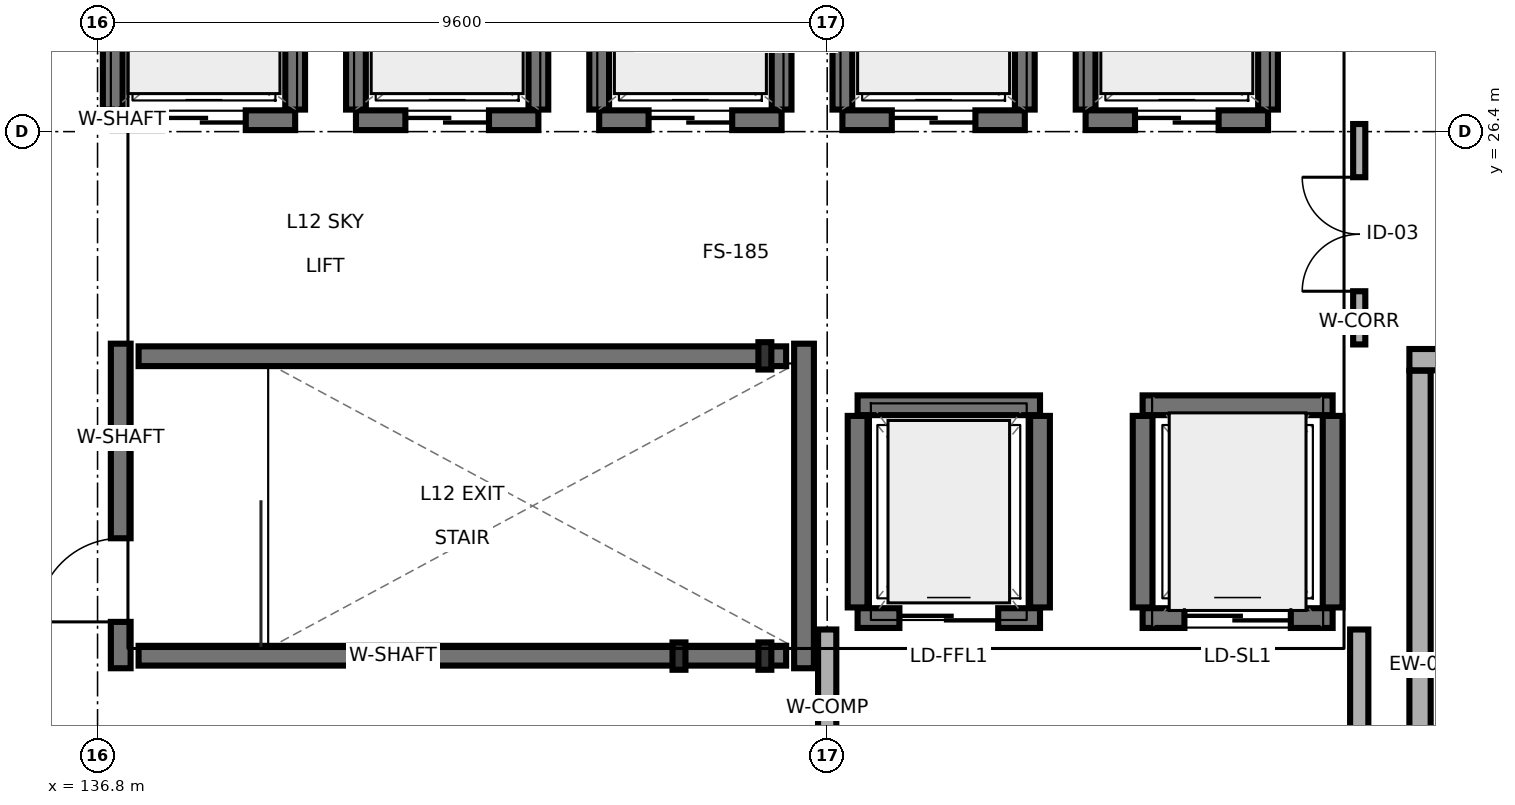
"""IFC4 building model, lengths in metres.
Left out: names, types, materials, properties, quantities, classifications, styles, units other than length and angle.
Written with IfcOpenShell. Run it as: python <this file> out.ifc"""

import sys

from ifc_helpers import new_model, si_unit, direction, frame, frame_2d, origin, origin_2d, place, context, subcontext, project, spatial, rectangle, i_section, extrude, element, fill, save


model = new_model("IFC4")
c1 = context("Model", 3, precision=1e-05, world=origin(), true_north=direction((0.0, 1.0)))
c2 = subcontext(c1, "Body", "Model", "MODEL_VIEW")
j1 = project(units=[si_unit("LENGTHUNIT", "METRE"), si_unit("PLANEANGLEUNIT", "RADIAN")], contexts=[c1])
p1 = place(None, origin())
s1 = spatial("IfcSite", under=j1, at=p1, CompositionType="ELEMENT")
p2 = place(p1, origin())
s2 = spatial("IfcBuilding", under=s1, at=p2, CompositionType="ELEMENT")
p3 = place(p2, frame((0.0, 0.0, 41.9)))
s3 = spatial("IfcBuildingStorey", under=s2, at=p3, CompositionType="ELEMENT", Elevation=41.9)
for number, where, z_axis, x_axis in (
    (1, (144.45, 19.5, 0.0), (0.0, 0.0, 1.0), (1.0, 0.0, 0.0)),
    (2, (145.58, 19.5, 0.0), (0.0, 0.0, 1.0), (1.0, 0.0, 0.0)),
    (3, (145.58, 23.45, 0.0), (0.0, 0.0, 1.0), (1.0, 0.0, 0.0)),
):
    element("IfcColumn", number, at=place(p3, frame(where, z_axis=z_axis, x_axis=x_axis)), inside=s3, PredefinedType="PILASTER", context=c2, shape_type="SweptSolid", body=[
        extrude(i_section(OverallWidth=0.17, OverallDepth=0.36, WebThickness=0.008, FlangeThickness=0.013, FilletRadius=0.018, at=origin_2d()), origin(), (0.0, 0.0, 1.0), 4.2),
    ])
p4 = place(p3, frame((154.2, 15.503, 0.0), z_axis=(0.0, 0.0, 1.0), x_axis=(0.0, 1.0, 0.0)))
e4 = element("IfcWall", 4, at=p4, inside=s3, PredefinedType="SOLIDWALL", context=c2, shape_type="SweptSolid", body=[
    extrude(rectangle(XDim=7.752, YDim=0.28, at=frame_2d((3.876, 0.0))), origin(), (0.0, 0.0, 1.0), 3.53),
])
p5 = place(p3, frame((154.06, 23.4, 0.0), z_axis=(0.0, 0.0, 1.0), x_axis=(1.0, 0.0, 0.0)))
e5 = element("IfcWall", 5, at=p5, inside=s3, PredefinedType="SOLIDWALL", context=c2, shape_type="SweptSolid", body=[
    extrude(rectangle(XDim=9.74, YDim=0.28, at=frame_2d((4.87, 0.0))), origin(), (0.0, 0.0, 1.0), 3.54),
])
p6 = place(p5, frame((4.07, 0.0, 0.0)))
e6 = element("IfcOpeningElement", 6, at=p6, cuts=e5, PredefinedType="OPENING", context=c2, shape_type="SweptSolid", body=[
    extrude(rectangle(XDim=1.6, YDim=2.2, at=frame_2d((0.8, 1.1))), frame((0.0, 0.15, 0.0), z_axis=(0.0, -1.0, 0.0), x_axis=(1.0, 0.0, 0.0)), (0.0, 0.0, 1.0), 0.3),
])
p7 = place(p3, frame((137.105, 19.34, 0.0), z_axis=(0.0, 0.0, 1.0), x_axis=(0.0, 1.0, 0.0)))
e7 = element("IfcWall", 7, at=p7, inside=s3, PredefinedType="SHEAR", context=c2, shape_type="SweptSolid", body=[
    extrude(rectangle(XDim=4.27, YDim=0.26, at=frame_2d((2.135, 0.0))), origin(), (0.0, 0.0, 1.0), 3.995),
])
p8 = place(p7, frame((0.61, 0.0, 0.0)))
e8 = element("IfcOpeningElement", 8, at=p8, cuts=e7, PredefinedType="OPENING", context=c2, shape_type="SweptSolid", body=[
    extrude(rectangle(XDim=1.1, YDim=2.2, at=frame_2d((0.55, 1.1))), frame((0.0, 0.14, 0.0), z_axis=(0.0, -1.0, 0.0), x_axis=(1.0, 0.0, 0.0)), (0.0, 0.0, 1.0), 0.28),
])
p9 = place(p3, frame((146.095, 19.34, 0.0), z_axis=(0.0, 0.0, 1.0), x_axis=(0.0, 1.0, 0.0)))
e9 = element("IfcWall", 9, at=p9, inside=s3, PredefinedType="SHEAR", context=c2, shape_type="SweptSolid", body=[
    extrude(rectangle(XDim=4.27, YDim=0.26, at=frame_2d((2.135, 0.0))), origin(), (0.0, 0.0, 1.0), 3.995),
])
for number, where, z_axis, x_axis in (
    (10, (137.34, 19.505, 0.0), (0.0, 0.0, 1.0), (1.0, 0.0, 0.0)),
    (11, (137.34, 23.445, 0.0), (0.0, 0.0, 1.0), (1.0, 0.0, 0.0)),
):
    element("IfcWall", number, at=place(p3, frame(where, z_axis=z_axis, x_axis=x_axis)), inside=s3, PredefinedType="SHEAR", context=c2, shape_type="SweptSolid", body=[
        extrude(rectangle(XDim=8.52, YDim=0.26, at=frame_2d((4.26, 0.0))), origin(), (0.0, 0.0, 1.0), 3.995),
    ])
p10 = place(p3, frame((137.0, 26.55, 0.0), z_axis=(0.0, 0.0, 1.0), x_axis=(1.0, 0.0, 0.0)))
e12 = element("IfcWall", 12, at=p10, inside=s3, PredefinedType="SHEAR", context=c2, shape_type="SweptSolid", body=[
    extrude(rectangle(XDim=2.4, YDim=0.26, at=frame_2d((1.2, 0.0))), origin(), (0.0, 0.0, 1.0), 3.53),
])
p11 = place(p10, frame((0.65, 0.0, 0.0)))
e13 = element("IfcOpeningElement", 13, at=p11, cuts=e12, PredefinedType="OPENING", context=c2, shape_type="SweptSolid", body=[
    extrude(rectangle(XDim=1.1, YDim=2.2, at=frame_2d((0.55, 1.1))), frame((0.0, 0.14, 0.0), z_axis=(0.0, -1.0, 0.0), x_axis=(1.0, 0.0, 0.0)), (0.0, 0.0, 1.0), 0.28),
])
for number, where, z_axis, x_axis in (
    (14, (137.0, 26.69, 0.0), (0.0, 0.0, 1.0), (0.0, 1.0, 0.0)),
    (15, (139.4, 26.69, 0.0), (0.0, 0.0, 1.0), (0.0, 1.0, 0.0)),
):
    element("IfcWall", number, at=place(p3, frame(where, z_axis=z_axis, x_axis=x_axis)), inside=s3, PredefinedType="SHEAR", context=c2, shape_type="SweptSolid", body=[
        extrude(rectangle(XDim=1.82, YDim=0.26, at=frame_2d((0.91, 0.0))), origin(), (0.0, 0.0, 1.0), 3.53),
    ])
p12 = place(p3, frame((140.2, 26.55, 0.0), z_axis=(0.0, 0.0, 1.0), x_axis=(1.0, 0.0, 0.0)))
e16 = element("IfcWall", 16, at=p12, inside=s3, PredefinedType="SHEAR", context=c2, shape_type="SweptSolid", body=[
    extrude(rectangle(XDim=2.4, YDim=0.26, at=frame_2d((1.2, 0.0))), origin(), (0.0, 0.0, 1.0), 3.995),
])
p13 = place(p12, frame((0.65, 0.0, 0.0)))
e17 = element("IfcOpeningElement", 17, at=p13, cuts=e16, PredefinedType="OPENING", context=c2, shape_type="SweptSolid", body=[
    extrude(rectangle(XDim=1.1, YDim=2.2, at=frame_2d((0.55, 1.1))), frame((0.0, 0.14, 0.0), z_axis=(0.0, -1.0, 0.0), x_axis=(1.0, 0.0, 0.0)), (0.0, 0.0, 1.0), 0.28),
])
for number, where, z_axis, x_axis in (
    (18, (140.2, 26.69, 0.0), (0.0, 0.0, 1.0), (0.0, 1.0, 0.0)),
    (19, (142.6, 26.69, 0.0), (0.0, 0.0, 1.0), (0.0, 1.0, 0.0)),
):
    element("IfcWall", number, at=place(p3, frame(where, z_axis=z_axis, x_axis=x_axis)), inside=s3, PredefinedType="SHEAR", context=c2, shape_type="SweptSolid", body=[
        extrude(rectangle(XDim=1.82, YDim=0.26, at=frame_2d((0.91, 0.0))), origin(), (0.0, 0.0, 1.0), 3.995),
    ])
p14 = place(p3, frame((143.4, 26.55, 0.0), z_axis=(0.0, 0.0, 1.0), x_axis=(1.0, 0.0, 0.0)))
e20 = element("IfcWall", 20, at=p14, inside=s3, PredefinedType="SHEAR", context=c2, shape_type="SweptSolid", body=[
    extrude(rectangle(XDim=2.4, YDim=0.26, at=frame_2d((1.2, 0.0))), origin(), (0.0, 0.0, 1.0), 3.995),
])
p15 = place(p14, frame((0.65, 0.0, 0.0)))
e21 = element("IfcOpeningElement", 21, at=p15, cuts=e20, PredefinedType="OPENING", context=c2, shape_type="SweptSolid", body=[
    extrude(rectangle(XDim=1.1, YDim=2.2, at=frame_2d((0.55, 1.1))), frame((0.0, 0.14, 0.0), z_axis=(0.0, -1.0, 0.0), x_axis=(1.0, 0.0, 0.0)), (0.0, 0.0, 1.0), 0.28),
])
for number, where, z_axis, x_axis in (
    (22, (143.4, 26.69, 0.0), (0.0, 0.0, 1.0), (0.0, 1.0, 0.0)),
    (23, (145.8, 26.69, 0.0), (0.0, 0.0, 1.0), (0.0, 1.0, 0.0)),
):
    element("IfcWall", number, at=place(p3, frame(where, z_axis=z_axis, x_axis=x_axis)), inside=s3, PredefinedType="SHEAR", context=c2, shape_type="SweptSolid", body=[
        extrude(rectangle(XDim=1.82, YDim=0.26, at=frame_2d((0.91, 0.0))), origin(), (0.0, 0.0, 1.0), 3.995),
    ])
p16 = place(p3, frame((146.6, 26.55, 0.0), z_axis=(0.0, 0.0, 1.0), x_axis=(1.0, 0.0, 0.0)))
e24 = element("IfcWall", 24, at=p16, inside=s3, PredefinedType="SHEAR", context=c2, shape_type="SweptSolid", body=[
    extrude(rectangle(XDim=2.4, YDim=0.26, at=frame_2d((1.2, 0.0))), origin(), (0.0, 0.0, 1.0), 3.995),
])
p17 = place(p16, frame((0.65, 0.0, 0.0)))
e25 = element("IfcOpeningElement", 25, at=p17, cuts=e24, PredefinedType="OPENING", context=c2, shape_type="SweptSolid", body=[
    extrude(rectangle(XDim=1.1, YDim=2.2, at=frame_2d((0.55, 1.1))), frame((0.0, 0.14, 0.0), z_axis=(0.0, -1.0, 0.0), x_axis=(1.0, 0.0, 0.0)), (0.0, 0.0, 1.0), 0.28),
])
for number, where, z_axis, x_axis in (
    (26, (146.6, 26.69, 0.0), (0.0, 0.0, 1.0), (0.0, 1.0, 0.0)),
    (27, (149.0, 26.69, 0.0), (0.0, 0.0, 1.0), (0.0, 1.0, 0.0)),
):
    element("IfcWall", number, at=place(p3, frame(where, z_axis=z_axis, x_axis=x_axis)), inside=s3, PredefinedType="SHEAR", context=c2, shape_type="SweptSolid", body=[
        extrude(rectangle(XDim=1.82, YDim=0.26, at=frame_2d((0.91, 0.0))), origin(), (0.0, 0.0, 1.0), 3.995),
    ])
p18 = place(p3, frame((149.8, 26.55, 0.0), z_axis=(0.0, 0.0, 1.0), x_axis=(1.0, 0.0, 0.0)))
e28 = element("IfcWall", 28, at=p18, inside=s3, PredefinedType="SHEAR", context=c2, shape_type="SweptSolid", body=[
    extrude(rectangle(XDim=2.4, YDim=0.26, at=frame_2d((1.2, 0.0))), origin(), (0.0, 0.0, 1.0), 3.995),
])
p19 = place(p18, frame((0.65, 0.0, 0.0)))
e29 = element("IfcOpeningElement", 29, at=p19, cuts=e28, PredefinedType="OPENING", context=c2, shape_type="SweptSolid", body=[
    extrude(rectangle(XDim=1.1, YDim=2.2, at=frame_2d((0.55, 1.1))), frame((0.0, 0.14, 0.0), z_axis=(0.0, -1.0, 0.0), x_axis=(1.0, 0.0, 0.0)), (0.0, 0.0, 1.0), 0.28),
])
for number, where, z_axis, x_axis in (
    (30, (149.8, 26.69, 0.0), (0.0, 0.0, 1.0), (0.0, 1.0, 0.0)),
    (31, (152.2, 26.69, 0.0), (0.0, 0.0, 1.0), (0.0, 1.0, 0.0)),
):
    element("IfcWall", number, at=place(p3, frame(where, z_axis=z_axis, x_axis=x_axis)), inside=s3, PredefinedType="SHEAR", context=c2, shape_type="SweptSolid", body=[
        extrude(rectangle(XDim=1.82, YDim=0.26, at=frame_2d((0.91, 0.0))), origin(), (0.0, 0.0, 1.0), 3.995),
    ])
p20 = place(p3, frame((146.8, 20.0, 0.0), z_axis=(0.0, 0.0, 1.0), x_axis=(1.0, 0.0, 0.0)))
e32 = element("IfcWall", 32, at=p20, inside=s3, PredefinedType="SHEAR", context=c2, shape_type="SweptSolid", body=[
    extrude(rectangle(XDim=2.4, YDim=0.26, at=frame_2d((1.2, 0.0))), origin(), (0.0, 0.0, 1.0), 3.995),
])
p21 = place(p20, frame((0.55, 0.0, 0.0)))
e33 = element("IfcOpeningElement", 33, at=p21, cuts=e32, PredefinedType="OPENING", context=c2, shape_type="SweptSolid", body=[
    extrude(rectangle(XDim=1.3, YDim=2.25, at=frame_2d((0.65, 1.125))), frame((0.0, 0.14, 0.0), z_axis=(0.0, -1.0, 0.0), x_axis=(1.0, 0.0, 0.0)), (0.0, 0.0, 1.0), 0.28),
])
p22 = place(p3, frame((146.8, 22.8, 0.0), z_axis=(0.0, 0.0, 1.0), x_axis=(1.0, 0.0, 0.0)))
e34 = element("IfcWall", 34, at=p22, inside=s3, PredefinedType="SHEAR", context=c2, shape_type="SweptSolid", body=[
    extrude(rectangle(XDim=2.4, YDim=0.26, at=frame_2d((1.2, 0.0))), origin(), (0.0, 0.0, 1.0), 3.995),
])
for number, where, z_axis, x_axis in (
    (35, (146.8, 20.14, 0.0), (0.0, 0.0, 1.0), (0.0, 1.0, 0.0)),
    (36, (149.2, 20.14, 0.0), (0.0, 0.0, 1.0), (0.0, 1.0, 0.0)),
):
    element("IfcWall", number, at=place(p3, frame(where, z_axis=z_axis, x_axis=x_axis)), inside=s3, PredefinedType="SHEAR", context=c2, shape_type="SweptSolid", body=[
        extrude(rectangle(XDim=2.52, YDim=0.26, at=frame_2d((1.26, 0.0))), origin(), (0.0, 0.0, 1.0), 3.995),
    ])
p23 = place(p3, frame((150.55, 20.0, 0.0), z_axis=(0.0, 0.0, 1.0), x_axis=(1.0, 0.0, 0.0)))
e37 = element("IfcWall", 37, at=p23, inside=s3, PredefinedType="SHEAR", context=c2, shape_type="SweptSolid", body=[
    extrude(rectangle(XDim=2.5, YDim=0.26, at=frame_2d((1.25, 0.0))), origin(), (0.0, 0.0, 1.0), 3.995),
])
p24 = place(p23, frame((0.55, 0.0, 0.0)))
e38 = element("IfcOpeningElement", 38, at=p24, cuts=e37, PredefinedType="OPENING", context=c2, shape_type="SweptSolid", body=[
    extrude(rectangle(XDim=1.4, YDim=2.3, at=frame_2d((0.7, 1.15))), frame((0.0, 0.14, 0.0), z_axis=(0.0, -1.0, 0.0), x_axis=(1.0, 0.0, 0.0)), (0.0, 0.0, 1.0), 0.28),
])
p25 = place(p3, frame((150.55, 22.8, 0.0), z_axis=(0.0, 0.0, 1.0), x_axis=(1.0, 0.0, 0.0)))
e39 = element("IfcWall", 39, at=p25, inside=s3, PredefinedType="SHEAR", context=c2, shape_type="SweptSolid", body=[
    extrude(rectangle(XDim=2.5, YDim=0.26, at=frame_2d((1.25, 0.0))), origin(), (0.0, 0.0, 1.0), 3.995),
])
for number, where, z_axis, x_axis in (
    (40, (150.55, 20.14, 0.0), (0.0, 0.0, 1.0), (0.0, 1.0, 0.0)),
    (41, (153.05, 20.14, 0.0), (0.0, 0.0, 1.0), (0.0, 1.0, 0.0)),
):
    element("IfcWall", number, at=place(p3, frame(where, z_axis=z_axis, x_axis=x_axis)), inside=s3, PredefinedType="SHEAR", context=c2, shape_type="SweptSolid", body=[
        extrude(rectangle(XDim=2.52, YDim=0.26, at=frame_2d((1.26, 0.0))), origin(), (0.0, 0.0, 1.0), 3.995),
    ])
p26 = place(p3, frame((146.4, 15.925, 0.0), z_axis=(0.0, 0.0, 1.0), x_axis=(0.0, 1.0, 0.0)))
e42 = element("IfcWall", 42, at=p26, inside=s3, PredefinedType="SOLIDWALL", context=c2, shape_type="SweptSolid", body=[
    extrude(rectangle(XDim=3.925, YDim=0.24, at=frame_2d((1.962, 0.0))), origin(), (0.0, 0.0, 1.0), 3.53),
])
p27 = place(p26, frame((0.16, 0.0, 0.0)))
e43 = element("IfcOpeningElement", 43, at=p27, cuts=e42, PredefinedType="OPENING", context=c2, shape_type="SweptSolid", body=[
    extrude(rectangle(XDim=1.6, YDim=2.2, at=frame_2d((0.8, 1.1))), frame((0.0, 0.13, 0.0), z_axis=(0.0, -1.0, 0.0), x_axis=(1.0, 0.0, 0.0)), (0.0, 0.0, 1.0), 0.26),
])
p28 = place(p3, frame((153.4, 15.925, 0.0), z_axis=(0.0, 0.0, 1.0), x_axis=(0.0, 1.0, 0.0)))
e44 = element("IfcWall", 44, at=p28, inside=s3, PredefinedType="SOLIDWALL", context=c2, shape_type="SweptSolid", body=[
    extrude(rectangle(XDim=3.925, YDim=0.24, at=frame_2d((1.962, 0.0))), origin(), (0.0, 0.0, 1.0), 3.53),
])
p29 = place(p3, frame((153.4, 23.6, 0.0), z_axis=(0.0, 0.0, 1.0), x_axis=(0.0, 1.0, 0.0)))
e45 = element("IfcWall", 45, at=p29, inside=s3, PredefinedType="PARTITIONING", context=c2, shape_type="SweptSolid", body=[
    extrude(rectangle(XDim=2.9, YDim=0.16, at=frame_2d((1.45, 0.0))), origin(), (0.0, 0.0, 1.0), 3.995),
])
p30 = place(p29, frame((0.7, 0.0, 0.0)))
e46 = element("IfcOpeningElement", 46, at=p30, cuts=e45, PredefinedType="OPENING", context=c2, shape_type="SweptSolid", body=[
    extrude(rectangle(XDim=1.5, YDim=2.25, at=frame_2d((0.75, 1.125))), frame((0.0, 0.09, 0.0), z_axis=(0.0, -1.0, 0.0), x_axis=(1.0, 0.0, 0.0)), (0.0, 0.0, 1.0), 0.18),
])
p31 = place(p8, origin())
e47 = element("IfcDoor", 47, at=p31, inside=s3, OperationType="SINGLE_SWING_LEFT", PredefinedType="DOOR", context=c2, shape_type="SweptSolid", body=[
    extrude(rectangle(XDim=1.1, YDim=2.2, at=frame_2d((0.55, 1.1))), frame((0.0, 0.025, 0.0), z_axis=(0.0, -1.0, 0.0), x_axis=(1.0, 0.0, 0.0)), (0.0, 0.0, 1.0), 0.05),
])
fill(e8, e47)
p32 = place(p11, origin())
e48 = element("IfcDoor", 48, at=p32, inside=s3, OperationType="SLIDING_TO_LEFT", PredefinedType="DOOR", context=c2, shape_type="SweptSolid", body=[
    extrude(rectangle(XDim=1.1, YDim=2.2, at=frame_2d((0.55, 1.1))), frame((0.0, 0.025, 0.0), z_axis=(0.0, -1.0, 0.0), x_axis=(1.0, 0.0, 0.0)), (0.0, 0.0, 1.0), 0.05),
])
fill(e13, e48)
p33 = place(p13, origin())
e49 = element("IfcDoor", 49, at=p33, inside=s3, OperationType="SLIDING_TO_RIGHT", PredefinedType="DOOR", context=c2, shape_type="SweptSolid", body=[
    extrude(rectangle(XDim=1.1, YDim=2.2, at=frame_2d((0.55, 1.1))), frame((0.0, 0.025, 0.0), z_axis=(0.0, -1.0, 0.0), x_axis=(1.0, 0.0, 0.0)), (0.0, 0.0, 1.0), 0.05),
])
fill(e17, e49)
p34 = place(p15, origin())
e50 = element("IfcDoor", 50, at=p34, inside=s3, OperationType="SLIDING_TO_LEFT", PredefinedType="DOOR", context=c2, shape_type="SweptSolid", body=[
    extrude(rectangle(XDim=1.1, YDim=2.2, at=frame_2d((0.55, 1.1))), frame((0.0, 0.025, 0.0), z_axis=(0.0, -1.0, 0.0), x_axis=(1.0, 0.0, 0.0)), (0.0, 0.0, 1.0), 0.05),
])
fill(e21, e50)
p35 = place(p17, origin())
e51 = element("IfcDoor", 51, at=p35, inside=s3, OperationType="SLIDING_TO_RIGHT", PredefinedType="DOOR", context=c2, shape_type="SweptSolid", body=[
    extrude(rectangle(XDim=1.1, YDim=2.2, at=frame_2d((0.55, 1.1))), frame((0.0, 0.025, 0.0), z_axis=(0.0, -1.0, 0.0), x_axis=(1.0, 0.0, 0.0)), (0.0, 0.0, 1.0), 0.05),
])
fill(e25, e51)
p36 = place(p19, origin())
e52 = element("IfcDoor", 52, at=p36, inside=s3, OperationType="SLIDING_TO_LEFT", PredefinedType="DOOR", context=c2, shape_type="SweptSolid", body=[
    extrude(rectangle(XDim=1.1, YDim=2.2, at=frame_2d((0.55, 1.1))), frame((0.0, 0.025, 0.0), z_axis=(0.0, -1.0, 0.0), x_axis=(1.0, 0.0, 0.0)), (0.0, 0.0, 1.0), 0.05),
])
fill(e29, e52)
p37 = place(p21, origin())
e53 = element("IfcDoor", 53, at=p37, inside=s3, OperationType="SLIDING_TO_RIGHT", PredefinedType="DOOR", context=c2, shape_type="SweptSolid", body=[
    extrude(rectangle(XDim=1.3, YDim=2.25, at=frame_2d((0.65, 1.125))), frame((0.0, 0.025, 0.0), z_axis=(0.0, -1.0, 0.0), x_axis=(1.0, 0.0, 0.0)), (0.0, 0.0, 1.0), 0.05),
])
fill(e33, e53)
p38 = place(p24, origin())
e54 = element("IfcDoor", 54, at=p38, inside=s3, OperationType="SLIDING_TO_LEFT", PredefinedType="DOOR", context=c2, shape_type="SweptSolid", body=[
    extrude(rectangle(XDim=1.4, YDim=2.3, at=frame_2d((0.7, 1.15))), frame((0.0, 0.025, 0.0), z_axis=(0.0, -1.0, 0.0), x_axis=(1.0, 0.0, 0.0)), (0.0, 0.0, 1.0), 0.05),
])
fill(e38, e54)
p39 = place(p30, origin())
e55 = element("IfcDoor", 55, at=p39, inside=s3, OperationType="DOUBLE_DOOR_SINGLE_SWING", PredefinedType="DOOR", context=c2, shape_type="SweptSolid", body=[
    extrude(rectangle(XDim=1.5, YDim=2.25, at=frame_2d((0.75, 1.125))), frame((0.0, 0.025, 0.0), z_axis=(0.0, -1.0, 0.0), x_axis=(1.0, 0.0, 0.0)), (0.0, 0.0, 1.0), 0.05),
])
fill(e46, e55)
save(model, sys.argv[1])
